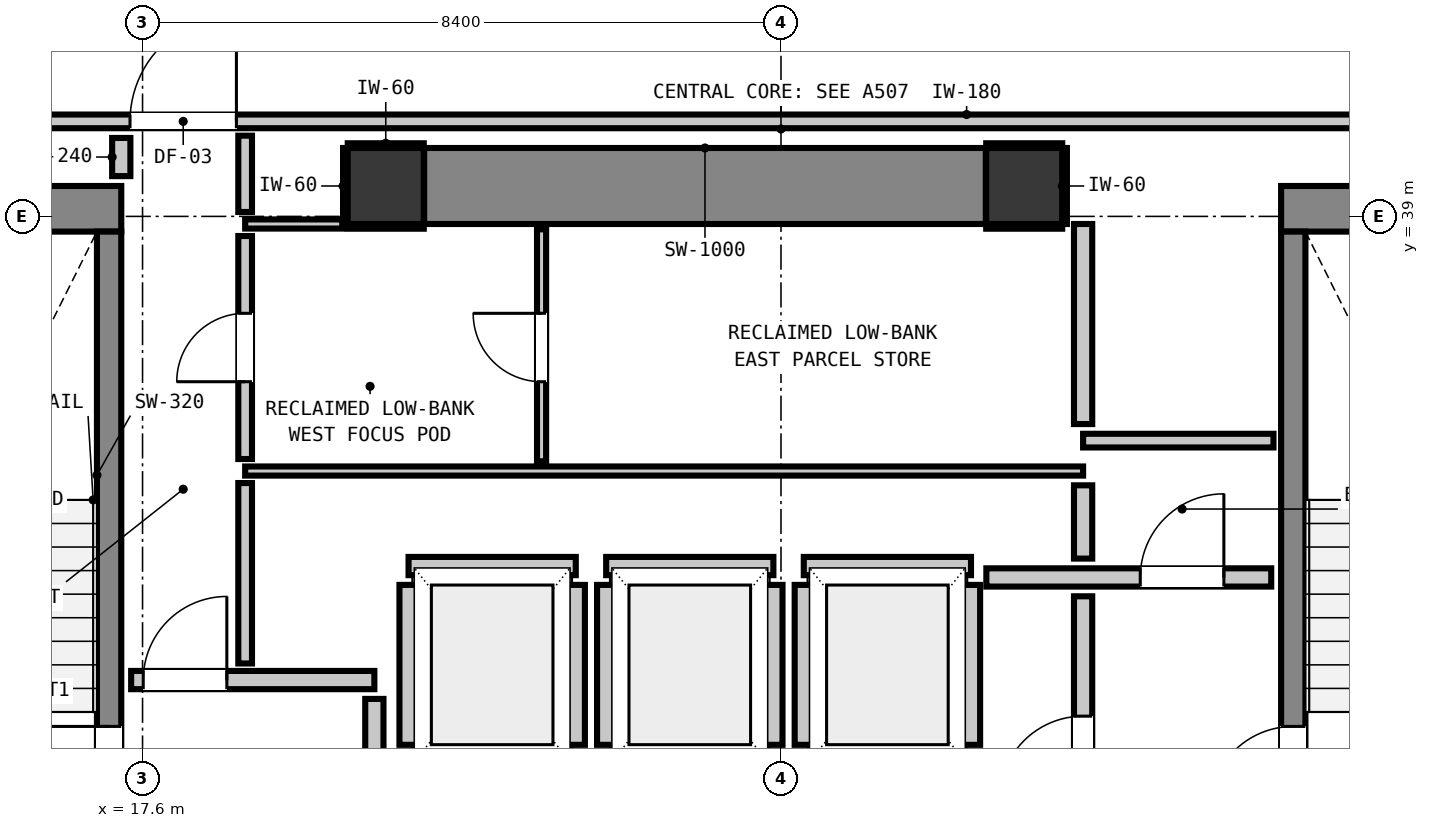
"""IFC4 building model, lengths in metres.
Left out: names, types, materials, properties, quantities, classifications, styles, units other than length and angle.
Written with IfcOpenShell. Run it as: python <this file> out.ifc"""

import sys

from ifc_helpers import new_model, si_unit, direction, frame, frame_2d, origin, origin_2d, place, context, subcontext, project, spatial, rectangle, extrude, element, fill, save


model = new_model("IFC4")
c1 = context("Model", 3, precision=1e-05, world=origin(), true_north=direction((0.0, 1.0)))
c2 = subcontext(c1, "Body", "Model", "MODEL_VIEW")
j1 = project(units=[si_unit("LENGTHUNIT", "METRE"), si_unit("PLANEANGLEUNIT", "RADIAN")], contexts=[c1])
p1 = place(None, origin())
s1 = spatial("IfcSite", under=j1, at=p1, CompositionType="ELEMENT")
p2 = place(p1, origin())
s2 = spatial("IfcBuilding", under=s1, at=p2, CompositionType="ELEMENT")
p3 = place(p2, frame((0.0, 0.0, 152.56)))
s3 = spatial("IfcBuildingStorey", under=s2, at=p3, CompositionType="ELEMENT", Elevation=152.56)
for number, where, z_axis, x_axis in (
    (1, (20.8, 39.4, 0.0), (0.0, 0.0, 1.0), (1.0, 0.0, 0.0)),
    (2, (29.2, 39.4, 0.0), (0.0, 0.0, 1.0), (1.0, 0.0, 0.0)),
):
    element("IfcColumn", number, at=place(p3, frame(where, z_axis=z_axis, x_axis=x_axis)), inside=s3, PredefinedType="COLUMN", context=c2, shape_type="SweptSolid", body=[
        extrude(rectangle(XDim=1.0, YDim=1.0, at=origin_2d()), origin(), (0.0, 0.0, 1.0), 3.32),
    ])
p4 = place(p3, frame((13.24, 39.1, 0.0), z_axis=(0.0, 0.0, 1.0), x_axis=(1.0, 0.0, 0.0)))
e3 = element("IfcWall", 3, at=p4, inside=s3, PredefinedType="SHEAR", context=c2, shape_type="SweptSolid", body=[
    extrude(rectangle(XDim=4.08, YDim=0.6, at=frame_2d((2.04, 0.0))), origin(), (0.0, 0.0, 1.0), 3.32),
])
p5 = place(p3, frame((32.58, 39.1, 0.0), z_axis=(0.0, 0.0, 1.0), x_axis=(1.0, 0.0, 0.0)))
e4 = element("IfcWall", 4, at=p5, inside=s3, PredefinedType="SHEAR", context=c2, shape_type="SweptSolid", body=[
    extrude(rectangle(XDim=4.08, YDim=0.6, at=frame_2d((2.04, 0.0))), origin(), (0.0, 0.0, 1.0), 3.32),
])
p6 = place(p3, frame((21.305, 39.4, 0.0), z_axis=(0.0, 0.0, 1.0), x_axis=(1.0, 0.0, 0.0)))
e5 = element("IfcWall", 5, at=p6, inside=s3, PredefinedType="SHEAR", context=c2, shape_type="SweptSolid", body=[
    extrude(rectangle(XDim=7.39, YDim=1.0, at=frame_2d((3.695, 0.0))), origin(), (0.0, 0.0, 1.0), 3.32),
])
p7 = place(p3, frame((17.16, 31.0, 0.0), z_axis=(0.0, 0.0, 1.0), x_axis=(0.0, 1.0, 0.0)))
e6 = element("IfcWall", 6, at=p7, inside=s3, PredefinedType="SHEAR", context=c2, shape_type="SweptSolid", body=[
    extrude(rectangle(XDim=7.8, YDim=0.32, at=frame_2d((3.9, 0.0))), origin(), (0.0, 0.0, 1.0), 3.32),
])
p8 = place(p7, frame((0.19, 0.0, 0.0)))
e7 = element("IfcOpeningElement", 7, at=p8, cuts=e6, PredefinedType="OPENING", context=c2, shape_type="SweptSolid", body=[
    extrude(rectangle(XDim=1.1, YDim=2.15, at=frame_2d((0.55, 1.075))), frame((0.0, 0.17, 0.0), z_axis=(0.0, -1.0, 0.0), x_axis=(1.0, 0.0, 0.0)), (0.0, 0.0, 1.0), 0.34),
])
p9 = place(p3, frame((32.74, 31.0, 0.0), z_axis=(0.0, 0.0, 1.0), x_axis=(0.0, 1.0, 0.0)))
e8 = element("IfcWall", 8, at=p9, inside=s3, PredefinedType="SHEAR", context=c2, shape_type="SweptSolid", body=[
    extrude(rectangle(XDim=7.8, YDim=0.32, at=frame_2d((3.9, 0.0))), origin(), (0.0, 0.0, 1.0), 3.32),
])
p10 = place(p9, frame((0.19, 0.0, 0.0)))
e9 = element("IfcOpeningElement", 9, at=p10, cuts=e8, PredefinedType="OPENING", context=c2, shape_type="SweptSolid", body=[
    extrude(rectangle(XDim=1.1, YDim=2.15, at=frame_2d((0.55, 1.075))), frame((0.0, 0.17, 0.0), z_axis=(0.0, -1.0, 0.0), x_axis=(1.0, 0.0, 0.0)), (0.0, 0.0, 1.0), 0.34),
])
p11 = place(p3, frame((21.1, 34.4, 0.0), z_axis=(0.0, 0.0, 1.0), x_axis=(1.0, 0.0, 0.0)))
e10 = element("IfcWall", 10, at=p11, inside=s3, PredefinedType="PARTITIONING", context=c2, shape_type="SweptSolid", body=[
    extrude(rectangle(XDim=2.2, YDim=0.24, at=frame_2d((1.1, 0.0))), origin(), (0.0, 0.0, 1.0), 3.08),
])
p12 = place(p3, frame((21.1, 32.048, 0.0), z_axis=(0.0, 0.0, 1.0), x_axis=(0.0, 1.0, 0.0)))
e11 = element("IfcWall", 11, at=p12, inside=s3, PredefinedType="PARTITIONING", context=c2, shape_type="SweptSolid", body=[
    extrude(rectangle(XDim=2.104, YDim=0.24, at=frame_2d((1.052, 0.0))), origin(), (0.0, 0.0, 1.0), 2.315),
])
p13 = place(p3, frame((23.3, 32.048, 0.0), z_axis=(0.0, 0.0, 1.0), x_axis=(0.0, 1.0, 0.0)))
e12 = element("IfcWall", 12, at=p13, inside=s3, PredefinedType="PARTITIONING", context=c2, shape_type="SweptSolid", body=[
    extrude(rectangle(XDim=2.104, YDim=0.24, at=frame_2d((1.052, 0.0))), origin(), (0.0, 0.0, 1.0), 3.08),
])
p14 = place(p3, frame((23.7, 34.4, 0.0), z_axis=(0.0, 0.0, 1.0), x_axis=(1.0, 0.0, 0.0)))
e13 = element("IfcWall", 13, at=p14, inside=s3, PredefinedType="PARTITIONING", context=c2, shape_type="SweptSolid", body=[
    extrude(rectangle(XDim=2.2, YDim=0.24, at=frame_2d((1.1, 0.0))), origin(), (0.0, 0.0, 1.0), 3.08),
])
for number, where, z_axis, x_axis in (
    (14, (23.7, 32.048, 0.0), (0.0, 0.0, 1.0), (0.0, 1.0, 0.0)),
    (15, (25.9, 32.048, 0.0), (0.0, 0.0, 1.0), (0.0, 1.0, 0.0)),
):
    element("IfcWall", number, at=place(p3, frame(where, z_axis=z_axis, x_axis=x_axis)), inside=s3, PredefinedType="PARTITIONING", context=c2, shape_type="SweptSolid", body=[
        extrude(rectangle(XDim=2.104, YDim=0.24, at=frame_2d((1.052, 0.0))), origin(), (0.0, 0.0, 1.0), 3.08),
    ])
p15 = place(p3, frame((26.3, 34.4, 0.0), z_axis=(0.0, 0.0, 1.0), x_axis=(1.0, 0.0, 0.0)))
e16 = element("IfcWall", 16, at=p15, inside=s3, PredefinedType="PARTITIONING", context=c2, shape_type="SweptSolid", body=[
    extrude(rectangle(XDim=2.2, YDim=0.24, at=frame_2d((1.1, 0.0))), origin(), (0.0, 0.0, 1.0), 3.08),
])
for number, where, z_axis, x_axis in (
    (17, (26.3, 32.048, 0.0), (0.0, 0.0, 1.0), (0.0, 1.0, 0.0)),
    (18, (28.5, 32.048, 0.0), (0.0, 0.0, 1.0), (0.0, 1.0, 0.0)),
):
    element("IfcWall", number, at=place(p3, frame(where, z_axis=z_axis, x_axis=x_axis)), inside=s3, PredefinedType="PARTITIONING", context=c2, shape_type="SweptSolid", body=[
        extrude(rectangle(XDim=2.104, YDim=0.24, at=frame_2d((1.052, 0.0))), origin(), (0.0, 0.0, 1.0), 3.08),
    ])
p16 = place(p3, frame((17.45, 32.9, 0.0), z_axis=(0.0, 0.0, 1.0), x_axis=(1.0, 0.0, 0.0)))
e19 = element("IfcWall", 19, at=p16, inside=s3, PredefinedType="PARTITIONING", context=c2, shape_type="SweptSolid", body=[
    extrude(rectangle(XDim=3.2, YDim=0.24, at=frame_2d((1.6, 0.0))), origin(), (0.0, 0.0, 1.0), 3.08),
])
p17 = place(p16, frame((0.159, 0.0, 0.0)))
e20 = element("IfcOpeningElement", 20, at=p17, cuts=e19, PredefinedType="OPENING", context=c2, shape_type="SweptSolid", body=[
    extrude(rectangle(XDim=1.1, YDim=2.15, at=frame_2d((0.55, 1.075))), frame((0.0, 0.13, 0.0), z_axis=(0.0, -1.0, 0.0), x_axis=(1.0, 0.0, 0.0)), (0.0, 0.0, 1.0), 0.26),
])
p18 = place(p3, frame((28.702, 34.25, 0.0), z_axis=(0.0, 0.0, 1.0), x_axis=(1.0, 0.0, 0.0)))
e21 = element("IfcWall", 21, at=p18, inside=s3, PredefinedType="PARTITIONING", context=c2, shape_type="SweptSolid", body=[
    extrude(rectangle(XDim=3.748, YDim=0.24, at=frame_2d((1.874, 0.0))), origin(), (0.0, 0.0, 1.0), 3.08),
])
p19 = place(p18, frame((2.025, 0.0, 0.0)))
e22 = element("IfcOpeningElement", 22, at=p19, cuts=e21, PredefinedType="OPENING", context=c2, shape_type="SweptSolid", body=[
    extrude(rectangle(XDim=1.1, YDim=2.15, at=frame_2d((0.55, 1.075))), frame((0.0, 0.13, 0.0), z_axis=(0.0, -1.0, 0.0), x_axis=(1.0, 0.0, 0.0)), (0.0, 0.0, 1.0), 0.26),
])
p20 = place(p3, frame((29.975, 36.05, 0.0), z_axis=(0.0, 0.0, 1.0), x_axis=(1.0, 0.0, 0.0)))
e23 = element("IfcWall", 23, at=p20, inside=s3, PredefinedType="PARTITIONING", context=c2, shape_type="SweptSolid", body=[
    extrude(rectangle(XDim=2.505, YDim=0.18, at=frame_2d((1.252, 0.0))), origin(), (0.0, 0.0, 1.0), 3.08),
])
p21 = place(p3, frame((9.407, 40.25, 0.0), z_axis=(0.0, 0.0, 1.0), x_axis=(1.0, 0.0, 0.0)))
e24 = element("IfcWall", 24, at=p21, inside=s3, PredefinedType="PARTITIONING", context=c2, shape_type="SweptSolid", body=[
    extrude(rectangle(XDim=39.386, YDim=0.18, at=frame_2d((19.693, 0.0))), origin(), (0.0, 0.0, 1.0), 3.08),
])
p22 = place(p21, frame((8.028, 0.0, 0.0)))
e25 = element("IfcOpeningElement", 25, at=p22, cuts=e24, PredefinedType="OPENING", context=c2, shape_type="SweptSolid", body=[
    extrude(rectangle(XDim=1.4, YDim=2.15, at=frame_2d((0.7, 1.075))), frame((0.0, 0.1, 0.0), z_axis=(0.0, -1.0, 0.0), x_axis=(1.0, 0.0, 0.0)), (0.0, 0.0, 1.0), 0.2),
])
p23 = place(p21, frame((1.192, 0.0, 0.0)))
e26 = element("IfcOpeningElement", 26, at=p23, cuts=e24, PredefinedType="OPENING", context=c2, shape_type="SweptSolid", body=[
    extrude(rectangle(XDim=1.4, YDim=2.15, at=frame_2d((0.7, 1.075))), frame((0.0, 0.1, 0.0), z_axis=(0.0, -1.0, 0.0), x_axis=(1.0, 0.0, 0.0)), (0.0, 0.0, 1.0), 0.2),
])
p24 = place(p21, frame((28.643, 0.0, 0.0)))
e27 = element("IfcOpeningElement", 27, at=p24, cuts=e24, PredefinedType="OPENING", context=c2, shape_type="SweptSolid", body=[
    extrude(rectangle(XDim=1.4, YDim=2.15, at=frame_2d((0.7, 1.075))), frame((0.0, 0.1, 0.0), z_axis=(0.0, -1.0, 0.0), x_axis=(1.0, 0.0, 0.0)), (0.0, 0.0, 1.0), 0.2),
])
p25 = place(p3, frame((18.95, 35.65, 0.0), z_axis=(0.0, 0.0, 1.0), x_axis=(1.0, 0.0, 0.0)))
e28 = element("IfcWall", 28, at=p25, inside=s3, PredefinedType="PARTITIONING", context=c2, shape_type="SweptSolid", body=[
    extrude(rectangle(XDim=11.025, YDim=0.12, at=frame_2d((5.513, 0.0))), origin(), (0.0, 0.0, 1.0), 3.08),
])
p26 = place(p3, frame((18.95, 38.9, 0.0), z_axis=(0.0, 0.0, 1.0), x_axis=(1.0, 0.0, 0.0)))
e29 = element("IfcWall", 29, at=p26, inside=s3, PredefinedType="PARTITIONING", context=c2, shape_type="SweptSolid", body=[
    extrude(rectangle(XDim=1.278, YDim=0.12, at=frame_2d((0.639, 0.0))), origin(), (0.0, 0.0, 1.0), 3.08),
])
p27 = place(p3, frame((17.32, 39.53, 0.0), z_axis=(0.0, 0.0, 1.0), x_axis=(0.0, 1.0, 0.0)))
e30 = element("IfcWall", 30, at=p27, inside=s3, PredefinedType="PARTITIONING", context=c2, shape_type="SweptSolid", body=[
    extrude(rectangle(XDim=0.502, YDim=0.24, at=frame_2d((0.251, 0.0))), origin(), (0.0, 0.0, 1.0), 3.08),
])
p28 = place(p3, frame((20.65, 31.868, 0.0), z_axis=(0.0, 0.0, 1.0), x_axis=(0.0, 1.0, 0.0)))
e31 = element("IfcWall", 31, at=p28, inside=s3, PredefinedType="PARTITIONING", context=c2, shape_type="SweptSolid", body=[
    extrude(rectangle(XDim=0.784, YDim=0.24, at=frame_2d((0.392, 0.0))), origin(), (0.0, 0.0, 1.0), 2.315),
])
p29 = place(p3, frame((29.975, 29.768, 0.0), z_axis=(0.0, 0.0, 1.0), x_axis=(0.0, 1.0, 0.0)))
e32 = element("IfcWall", 32, at=p29, inside=s3, PredefinedType="PARTITIONING", context=c2, shape_type="SweptSolid", body=[
    extrude(rectangle(XDim=4.234, YDim=0.24, at=frame_2d((2.117, 0.0))), origin(), (0.0, 0.0, 1.0), 3.08),
])
p30 = place(p29, frame((1.557, 0.0, 0.0)))
e33 = element("IfcOpeningElement", 33, at=p30, cuts=e32, PredefinedType="OPENING", context=c2, shape_type="SweptSolid", body=[
    extrude(rectangle(XDim=1.1, YDim=2.15, at=frame_2d((0.55, 1.075))), frame((0.0, 0.13, 0.0), z_axis=(0.0, -1.0, 0.0), x_axis=(1.0, 0.0, 0.0)), (0.0, 0.0, 1.0), 0.26),
])
p31 = place(p3, frame((29.975, 34.498, 0.0), z_axis=(0.0, 0.0, 1.0), x_axis=(0.0, 1.0, 0.0)))
e34 = element("IfcWall", 34, at=p31, inside=s3, PredefinedType="PARTITIONING", context=c2, shape_type="SweptSolid", body=[
    extrude(rectangle(XDim=0.964, YDim=0.24, at=frame_2d((0.482, 0.0))), origin(), (0.0, 0.0, 1.0), 3.08),
])
p32 = place(p3, frame((29.975, 36.268, 0.0), z_axis=(0.0, 0.0, 1.0), x_axis=(0.0, 1.0, 0.0)))
e35 = element("IfcWall", 35, at=p32, inside=s3, PredefinedType="PARTITIONING", context=c2, shape_type="SweptSolid", body=[
    extrude(rectangle(XDim=2.632, YDim=0.24, at=frame_2d((1.316, 0.0))), origin(), (0.0, 0.0, 1.0), 3.08),
])
p33 = place(p3, frame((18.95, 33.118, 0.0), z_axis=(0.0, 0.0, 1.0), x_axis=(0.0, 1.0, 0.0)))
e36 = element("IfcWall", 36, at=p33, inside=s3, PredefinedType="PARTITIONING", context=c2, shape_type="SweptSolid", body=[
    extrude(rectangle(XDim=2.374, YDim=0.18, at=frame_2d((1.187, 0.0))), origin(), (0.0, 0.0, 1.0), 3.08),
])
p34 = place(p3, frame((18.95, 35.808, 0.0), z_axis=(0.0, 0.0, 1.0), x_axis=(0.0, 1.0, 0.0)))
e37 = element("IfcWall", 37, at=p34, inside=s3, PredefinedType="PARTITIONING", context=c2, shape_type="SweptSolid", body=[
    extrude(rectangle(XDim=2.934, YDim=0.18, at=frame_2d((1.467, 0.0))), origin(), (0.0, 0.0, 1.0), 3.08),
])
p35 = place(p34, frame((1.017, 0.0, 0.0)))
e38 = element("IfcOpeningElement", 38, at=p35, cuts=e37, PredefinedType="OPENING", context=c2, shape_type="SweptSolid", body=[
    extrude(rectangle(XDim=0.9, YDim=2.1, at=frame_2d((0.45, 1.05))), frame((0.0, 0.1, 0.0), z_axis=(0.0, -1.0, 0.0), x_axis=(1.0, 0.0, 0.0)), (0.0, 0.0, 1.0), 0.2),
])
p36 = place(p3, frame((18.95, 39.058, 0.0), z_axis=(0.0, 0.0, 1.0), x_axis=(0.0, 1.0, 0.0)))
e39 = element("IfcWall", 39, at=p36, inside=s3, PredefinedType="PARTITIONING", context=c2, shape_type="SweptSolid", body=[
    extrude(rectangle(XDim=1.004, YDim=0.18, at=frame_2d((0.502, 0.0))), origin(), (0.0, 0.0, 1.0), 3.08),
])
p37 = place(p3, frame((22.85, 35.778, 0.0), z_axis=(0.0, 0.0, 1.0), x_axis=(0.0, 1.0, 0.0)))
e40 = element("IfcWall", 40, at=p37, inside=s3, PredefinedType="PARTITIONING", context=c2, shape_type="SweptSolid", body=[
    extrude(rectangle(XDim=3.052, YDim=0.12, at=frame_2d((1.526, 0.0))), origin(), (0.0, 0.0, 1.0), 3.08),
])
p38 = place(p37, frame((1.047, 0.0, 0.0)))
e41 = element("IfcOpeningElement", 41, at=p38, cuts=e40, PredefinedType="OPENING", context=c2, shape_type="SweptSolid", body=[
    extrude(rectangle(XDim=0.9, YDim=2.1, at=frame_2d((0.45, 1.05))), frame((0.0, 0.07, 0.0), z_axis=(0.0, -1.0, 0.0), x_axis=(1.0, 0.0, 0.0)), (0.0, 0.0, 1.0), 0.14),
])
for number, where, z_axis, x_axis in (
    (42, (20.3, 38.868, 0.0), (0.0, 0.0, 1.0), (1.0, 0.0, 0.0)),
    (43, (20.3, 39.932, 0.0), (0.0, 0.0, 1.0), (1.0, 0.0, 0.0)),
    (44, (20.268, 38.9, 0.0), (0.0, 0.0, 1.0), (0.0, 1.0, 0.0)),
    (45, (28.7, 38.868, 0.0), (0.0, 0.0, 1.0), (1.0, 0.0, 0.0)),
    (46, (28.7, 39.932, 0.0), (0.0, 0.0, 1.0), (1.0, 0.0, 0.0)),
    (47, (29.732, 38.9, 0.0), (0.0, 0.0, 1.0), (0.0, 1.0, 0.0)),
):
    element("IfcWall", number, at=place(p3, frame(where, z_axis=z_axis, x_axis=x_axis)), inside=s3, PredefinedType="PARTITIONING", context=c2, shape_type="SweptSolid", body=[
        extrude(rectangle(XDim=1.0, YDim=0.06, at=frame_2d((0.5, 0.0))), origin(), (0.0, 0.0, 1.0), 1.45),
    ])
p39 = place(p8, origin())
e48 = element("IfcDoor", 48, at=p39, inside=s3, OperationType="SINGLE_SWING_RIGHT", PredefinedType="DOOR", context=c2, shape_type="SweptSolid", body=[
    extrude(rectangle(XDim=1.1, YDim=2.15, at=frame_2d((0.55, 1.075))), frame((0.0, 0.025, 0.0), z_axis=(0.0, -1.0, 0.0), x_axis=(1.0, 0.0, 0.0)), (0.0, 0.0, 1.0), 0.05),
])
fill(e7, e48)
p40 = place(p10, origin())
e49 = element("IfcDoor", 49, at=p40, inside=s3, OperationType="SINGLE_SWING_LEFT", PredefinedType="DOOR", context=c2, shape_type="SweptSolid", body=[
    extrude(rectangle(XDim=1.1, YDim=2.15, at=frame_2d((0.55, 1.075))), frame((0.0, 0.025, 0.0), z_axis=(0.0, -1.0, 0.0), x_axis=(1.0, 0.0, 0.0)), (0.0, 0.0, 1.0), 0.05),
])
fill(e9, e49)
p41 = place(p17, origin())
e50 = element("IfcDoor", 50, at=p41, inside=s3, OperationType="SINGLE_SWING_RIGHT", PredefinedType="DOOR", context=c2, shape_type="SweptSolid", body=[
    extrude(rectangle(XDim=1.1, YDim=2.15, at=frame_2d((0.55, 1.075))), frame((0.0, 0.025, 0.0), z_axis=(0.0, -1.0, 0.0), x_axis=(1.0, 0.0, 0.0)), (0.0, 0.0, 1.0), 0.05),
])
fill(e20, e50)
p42 = place(p30, origin())
e51 = element("IfcDoor", 51, at=p42, inside=s3, OperationType="SINGLE_SWING_LEFT", PredefinedType="DOOR", context=c2, shape_type="SweptSolid", body=[
    extrude(rectangle(XDim=1.1, YDim=2.15, at=frame_2d((0.55, 1.075))), frame((0.0, 0.025, 0.0), z_axis=(0.0, -1.0, 0.0), x_axis=(1.0, 0.0, 0.0)), (0.0, 0.0, 1.0), 0.05),
])
fill(e33, e51)
p43 = place(p19, origin())
e52 = element("IfcDoor", 52, at=p43, inside=s3, OperationType="SINGLE_SWING_RIGHT", PredefinedType="DOOR", context=c2, shape_type="SweptSolid", body=[
    extrude(rectangle(XDim=1.1, YDim=2.15, at=frame_2d((0.55, 1.075))), frame((0.0, 0.025, 0.0), z_axis=(0.0, -1.0, 0.0), x_axis=(1.0, 0.0, 0.0)), (0.0, 0.0, 1.0), 0.05),
])
fill(e22, e52)
p44 = place(p22, origin())
e53 = element("IfcDoor", 53, at=p44, inside=s3, OperationType="SINGLE_SWING_RIGHT", PredefinedType="DOOR", context=c2, shape_type="SweptSolid", body=[
    extrude(rectangle(XDim=1.4, YDim=2.15, at=frame_2d((0.7, 1.075))), frame((0.0, 0.025, 0.0), z_axis=(0.0, -1.0, 0.0), x_axis=(1.0, 0.0, 0.0)), (0.0, 0.0, 1.0), 0.05),
])
fill(e25, e53)
p45 = place(p35, origin())
e54 = element("IfcDoor", 54, at=p45, inside=s3, OperationType="SINGLE_SWING_LEFT", PredefinedType="DOOR", context=c2, shape_type="SweptSolid", body=[
    extrude(rectangle(XDim=0.9, YDim=2.1, at=frame_2d((0.45, 1.05))), frame((0.0, 0.025, 0.0), z_axis=(0.0, -1.0, 0.0), x_axis=(1.0, 0.0, 0.0)), (0.0, 0.0, 1.0), 0.05),
])
fill(e38, e54)
p46 = place(p38, origin())
e55 = element("IfcDoor", 55, at=p46, inside=s3, OperationType="SINGLE_SWING_RIGHT", PredefinedType="DOOR", context=c2, shape_type="SweptSolid", body=[
    extrude(rectangle(XDim=0.9, YDim=2.1, at=frame_2d((0.45, 1.05))), frame((0.0, 0.025, 0.0), z_axis=(0.0, -1.0, 0.0), x_axis=(1.0, 0.0, 0.0)), (0.0, 0.0, 1.0), 0.05),
])
fill(e41, e55)
save(model, sys.argv[1])
